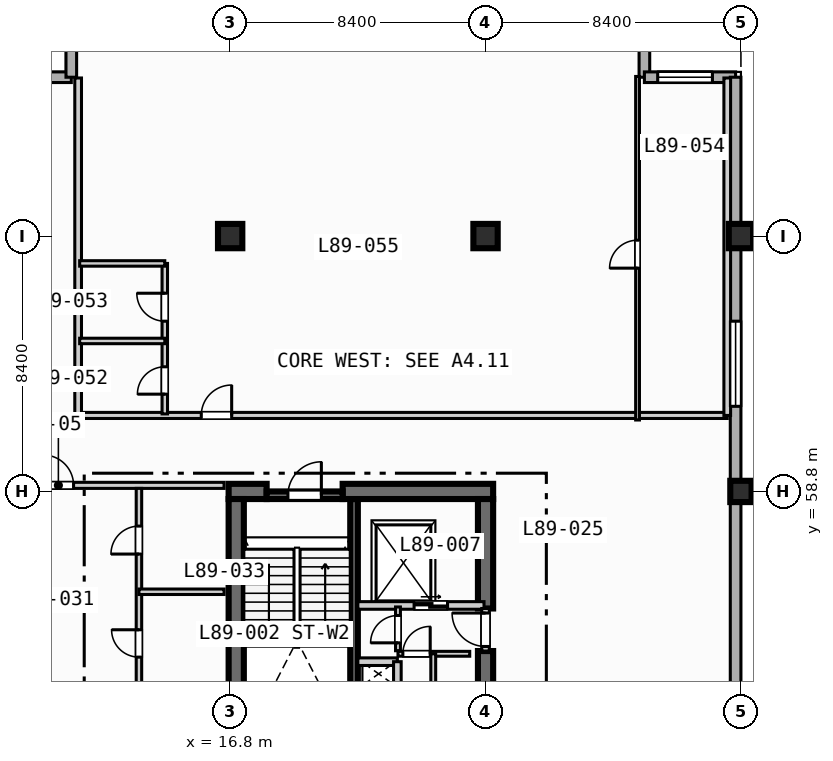
"""IFC4 building model, lengths in metres.
Left out: names, types, materials, properties, quantities, classifications, styles, units other than length and angle.
Written with IfcOpenShell. Run it as: python <this file> out.ifc"""

import sys

from ifc_helpers import new_model, si_unit, direction, frame, frame_2d, origin, origin_2d, place, context, subcontext, project, spatial, rectangle, extrude, element, fill, save


model = new_model("IFC4")
c1 = context("Model", 3, precision=1e-05, world=origin(), true_north=direction((0.0, 1.0)))
c2 = subcontext(c1, "Body", "Model", "MODEL_VIEW")
j1 = project(units=[si_unit("LENGTHUNIT", "METRE"), si_unit("PLANEANGLEUNIT", "RADIAN")], contexts=[c1])
p1 = place(None, origin())
s1 = spatial("IfcSite", under=j1, at=p1, CompositionType="ELEMENT")
p2 = place(p1, origin())
s2 = spatial("IfcBuilding", under=s1, at=p2, CompositionType="ELEMENT")
p3 = place(p2, frame((0.0, 0.0, 359.6)))
s3 = spatial("IfcBuildingStorey", under=s2, at=p3, CompositionType="ELEMENT", Elevation=359.6)
p4 = place(p3, frame((20.875, 50.5, 0.0), z_axis=(0.0, 0.0, 1.0), x_axis=(0.0, 1.0, 0.0)))
e1 = element("IfcWall", 1, at=p4, inside=s3, PredefinedType="SOLIDWALL", context=c2, shape_type="SweptSolid", body=[
    extrude(rectangle(XDim=8.05, YDim=0.25, at=frame_2d((4.025, 0.0))), origin(), (0.0, 0.0, 1.0), 3.9),
])
p5 = place(p3, frame((16.75, 58.8, 0.0), z_axis=(0.0, 0.0, 1.0), x_axis=(1.0, 0.0, 0.0)))
e2 = element("IfcWall", 2, at=p5, inside=s3, PredefinedType="SHEAR", context=c2, shape_type="SweptSolid", body=[
    extrude(rectangle(XDim=1.25, YDim=0.5, at=frame_2d((0.625, 0.0))), origin(), (0.0, 0.0, 1.0), 3.9),
])
p6 = place(p3, frame((20.5, 58.8, 0.0), z_axis=(0.0, 0.0, 1.0), x_axis=(1.0, 0.0, 0.0)))
e3 = element("IfcWall", 3, at=p6, inside=s3, PredefinedType="SHEAR", context=c2, shape_type="SweptSolid", body=[
    extrude(rectangle(XDim=4.95, YDim=0.5, at=frame_2d((2.475, 0.0))), origin(), (0.0, 0.0, 1.0), 3.9),
])
p7 = place(p3, frame((17.0, 42.2, 0.0), z_axis=(0.0, 0.0, 1.0), x_axis=(0.0, 1.0, 0.0)))
e4 = element("IfcWall", 4, at=p7, inside=s3, PredefinedType="SHEAR", context=c2, shape_type="SweptSolid", body=[
    extrude(rectangle(XDim=16.35, YDim=0.5, at=frame_2d((8.175, 0.0))), origin(), (0.0, 0.0, 1.0), 3.9),
])
p8 = place(p3, frame((25.2, 52.28, 0.0), z_axis=(0.0, 0.0, 1.0), x_axis=(0.0, 1.0, 0.0)))
e5 = element("IfcWall", 5, at=p8, inside=s3, PredefinedType="SHEAR", context=c2, shape_type="SweptSolid", body=[
    extrude(rectangle(XDim=1.27, YDim=0.5, at=frame_2d((0.635, 0.0))), origin(), (0.0, 0.0, 1.0), 3.9),
])
p9 = place(p3, frame((25.2, 54.95, 0.0), z_axis=(0.0, 0.0, 1.0), x_axis=(0.0, 1.0, 0.0)))
e6 = element("IfcWall", 6, at=p9, inside=s3, PredefinedType="SHEAR", context=c2, shape_type="SweptSolid", body=[
    extrude(rectangle(XDim=3.6, YDim=0.5, at=frame_2d((1.8, 0.0))), origin(), (0.0, 0.0, 1.0), 3.9),
])
for number, where, z_axis, x_axis in (
    (7, (16.8, 67.2, 0.0), (0.0, 0.0, 1.0), (1.0, 0.0, 0.0)),
    (8, (25.2, 67.2, 0.0), (0.0, 0.0, 1.0), (1.0, 0.0, 0.0)),
):
    element("IfcColumn", number, at=place(p3, frame(where, z_axis=z_axis, x_axis=x_axis)), inside=s3, PredefinedType="COLUMN", context=c2, shape_type="SweptSolid", body=[
        extrude(rectangle(XDim=0.8, YDim=0.8, at=origin_2d()), origin(), (0.0, 0.0, 1.0), 4.2),
    ])
p10 = place(p3, frame((33.6, 58.8, 0.0), z_axis=(0.0, 0.0, 1.0), x_axis=(1.0, 0.0, 0.0)))
e9 = element("IfcColumn", 9, at=p10, inside=s3, PredefinedType="COLUMN", context=c2, shape_type="SweptSolid", body=[
    extrude(rectangle(XDim=0.7, YDim=0.7, at=origin_2d()), origin(), (0.0, 0.0, 1.0), 4.2),
])
p11 = place(p3, frame((33.6, 67.2, 0.0), z_axis=(0.0, 0.0, 1.0), x_axis=(1.0, 0.0, 0.0)))
e10 = element("IfcColumn", 10, at=p11, inside=s3, PredefinedType="COLUMN", context=c2, shape_type="SweptSolid", body=[
    extrude(rectangle(XDim=0.8, YDim=0.8, at=origin_2d()), origin(), (0.0, 0.0, 1.0), 4.2),
])
for number, where, z_axis, x_axis in (
    (11, (8.575, 72.425, 0.0), (0.0, 0.0, 1.0), (1.0, 0.0, 0.0)),
    (12, (11.575, 72.425, 0.0), (0.0, 0.0, 1.0), (0.0, 1.0, 0.0)),
    (13, (30.425, 75.425, 0.0), (0.0, 0.0, 1.0), (0.0, -1.0, 0.0)),
):
    element("IfcWall", number, at=place(p3, frame(where, z_axis=z_axis, x_axis=x_axis)), inside=s3, PredefinedType="STANDARD", context=c2, shape_type="SweptSolid", body=[
        extrude(rectangle(XDim=3.0, YDim=0.35, at=frame_2d((1.5, 0.0))), origin(), (0.0, 0.0, 1.0), 3.9),
    ])
p12 = place(p3, frame((30.425, 72.425, 0.0), z_axis=(0.0, 0.0, 1.0), x_axis=(1.0, 0.0, 0.0)))
e14 = element("IfcWall", 14, at=p12, inside=s3, PredefinedType="STANDARD", context=c2, shape_type="SweptSolid", body=[
    extrude(rectangle(XDim=3.0, YDim=0.35, at=frame_2d((1.5, 0.0))), origin(), (0.0, 0.0, 1.0), 3.9),
])
p13 = place(p12, frame((0.438, 0.0, 0.85)))
e15 = element("IfcOpeningElement", 15, at=p13, cuts=e14, PredefinedType="OPENING", context=c2, shape_type="SweptSolid", body=[
    extrude(rectangle(XDim=1.8, YDim=1.8, at=frame_2d((0.9, 0.9))), frame((0.0, 0.185, 0.0), z_axis=(0.0, -1.0, 0.0), x_axis=(1.0, 0.0, 0.0)), (0.0, 0.0, 1.0), 0.37),
])
p14 = place(p3, frame((33.425, 72.425, 0.0), z_axis=(0.0, 0.0, 1.0), x_axis=(0.0, -1.0, 0.0)))
e16 = element("IfcWall", 16, at=p14, inside=s3, PredefinedType="STANDARD", context=c2, shape_type="SweptSolid", body=[
    extrude(rectangle(XDim=39.0, YDim=0.35, at=frame_2d((19.5, 0.0))), origin(), (0.0, 0.0, 1.0), 3.9),
])
p15 = place(p14, frame((33.225, 0.0, 0.85)))
e17 = element("IfcOpeningElement", 17, at=p15, cuts=e16, PredefinedType="OPENING", context=c2, shape_type="SweptSolid", body=[
    extrude(rectangle(XDim=2.8, YDim=2.1, at=frame_2d((1.4, 1.05))), frame((0.0, 0.185, 0.0), z_axis=(0.0, -1.0, 0.0), x_axis=(1.0, 0.0, 0.0)), (0.0, 0.0, 1.0), 0.37),
])
p16 = place(p14, frame((8.025, 0.0, 0.85)))
e18 = element("IfcOpeningElement", 18, at=p16, cuts=e16, PredefinedType="OPENING", context=c2, shape_type="SweptSolid", body=[
    extrude(rectangle(XDim=2.8, YDim=2.1, at=frame_2d((1.4, 1.05))), frame((0.0, 0.185, 0.0), z_axis=(0.0, -1.0, 0.0), x_axis=(1.0, 0.0, 0.0)), (0.0, 0.0, 1.0), 0.37),
])
p17 = place(p3, frame((18.0, 58.675, 0.0), z_axis=(0.0, 0.0, 1.0), x_axis=(1.0, 0.0, 0.0)))
e19 = element("IfcWall", 19, at=p17, inside=s3, PredefinedType="SOLIDWALL", context=c2, shape_type="SweptSolid", body=[
    extrude(rectangle(XDim=2.5, YDim=0.25, at=frame_2d((1.25, 0.0))), origin(), (0.0, 0.0, 1.0), 3.9),
])
p18 = place(p17, frame((0.7, 0.0, 0.0)))
e20 = element("IfcOpeningElement", 20, at=p18, cuts=e19, PredefinedType="OPENING", context=c2, shape_type="SweptSolid", body=[
    extrude(rectangle(XDim=1.1, YDim=2.15, at=frame_2d((0.55, 1.075))), frame((0.0, 0.135, 0.0), z_axis=(0.0, -1.0, 0.0), x_axis=(1.0, 0.0, 0.0)), (0.0, 0.0, 1.0), 0.27),
])
p19 = place(p3, frame((21.0, 55.05, 0.0), z_axis=(0.0, 0.0, 1.0), x_axis=(1.0, 0.0, 0.0)))
e21 = element("IfcWall", 21, at=p19, inside=s3, PredefinedType="SOLIDWALL", context=c2, shape_type="SweptSolid", body=[
    extrude(rectangle(XDim=4.15, YDim=0.25, at=frame_2d((2.075, 0.0))), origin(), (0.0, 0.0, 1.0), 3.9),
])
p20 = place(p19, frame((1.85, 0.0, 0.0)))
e22 = element("IfcOpeningElement", 22, at=p20, cuts=e21, PredefinedType="OPENING", context=c2, shape_type="SweptSolid", body=[
    extrude(rectangle(XDim=1.1, YDim=2.15, at=frame_2d((0.55, 1.075))), frame((0.0, 0.135, 0.0), z_axis=(0.0, -1.0, 0.0), x_axis=(1.0, 0.0, 0.0)), (0.0, 0.0, 1.0), 0.27),
])
p21 = place(p3, frame((25.2, 53.55, 0.0), z_axis=(0.0, 0.0, 1.0), x_axis=(0.0, 1.0, 0.0)))
e23 = element("IfcWall", 23, at=p21, inside=s3, PredefinedType="SOLIDWALL", context=c2, shape_type="SweptSolid", body=[
    extrude(rectangle(XDim=1.4, YDim=0.25, at=frame_2d((0.7, 0.0))), origin(), (0.0, 0.0, 1.0), 3.9),
])
p22 = place(p21, frame((0.15, 0.0, 0.0)))
e24 = element("IfcOpeningElement", 24, at=p22, cuts=e23, PredefinedType="OPENING", context=c2, shape_type="SweptSolid", body=[
    extrude(rectangle(XDim=1.1, YDim=2.15, at=frame_2d((0.55, 1.075))), frame((0.0, 0.135, 0.0), z_axis=(0.0, -1.0, 0.0), x_axis=(1.0, 0.0, 0.0)), (0.0, 0.0, 1.0), 0.27),
])
p23 = place(p3, frame((21.0, 53.2, 0.0), z_axis=(0.0, 0.0, 1.0), x_axis=(1.0, 0.0, 0.0)))
e25 = element("IfcWall", 25, at=p23, inside=s3, PredefinedType="SOLIDWALL", context=c2, shape_type="SweptSolid", body=[
    extrude(rectangle(XDim=1.3, YDim=0.25, at=frame_2d((0.65, 0.0))), origin(), (0.0, 0.0, 1.0), 3.9),
])
p24 = place(p3, frame((22.3, 52.36, 0.0), z_axis=(0.0, 0.0, 1.0), x_axis=(0.0, 1.0, 0.0)))
e26 = element("IfcWall", 26, at=p24, inside=s3, PredefinedType="SOLIDWALL", context=c2, shape_type="SweptSolid", body=[
    extrude(rectangle(XDim=0.84, YDim=0.25, at=frame_2d((0.42, 0.0))), origin(), (0.0, 0.0, 1.0), 3.9),
])
p25 = place(p3, frame((22.32, 53.56, 0.0), z_axis=(0.0, 0.0, 1.0), x_axis=(0.0, 1.0, 0.0)))
e27 = element("IfcWall", 27, at=p25, inside=s3, PredefinedType="PARTITIONING", context=c2, shape_type="SweptSolid", body=[
    extrude(rectangle(XDim=1.44, YDim=0.16, at=frame_2d((0.72, 0.0))), origin(), (0.0, 0.0, 1.0), 3.9),
])
p26 = place(p25, frame((0.26, 0.0, 0.0)))
e28 = element("IfcOpeningElement", 28, at=p26, cuts=e27, PredefinedType="OPENING", context=c2, shape_type="SweptSolid", body=[
    extrude(rectangle(XDim=0.9, YDim=2.1, at=frame_2d((0.45, 1.05))), frame((0.0, 0.09, 0.0), z_axis=(0.0, -1.0, 0.0), x_axis=(1.0, 0.0, 0.0)), (0.0, 0.0, 1.0), 0.18),
])
p27 = place(p3, frame((22.32, 53.46, 0.0), z_axis=(0.0, 0.0, 1.0), x_axis=(1.0, 0.0, 0.0)))
e29 = element("IfcWall", 29, at=p27, inside=s3, PredefinedType="PARTITIONING", context=c2, shape_type="SweptSolid", body=[
    extrude(rectangle(XDim=2.36, YDim=0.16, at=frame_2d((1.18, 0.0))), origin(), (0.0, 0.0, 1.0), 3.9),
])
p28 = place(p27, frame((0.16, 0.0, 0.0)))
e30 = element("IfcOpeningElement", 30, at=p28, cuts=e29, PredefinedType="OPENING", context=c2, shape_type="SweptSolid", body=[
    extrude(rectangle(XDim=0.9, YDim=2.1, at=frame_2d((0.45, 1.05))), frame((0.0, 0.09, 0.0), z_axis=(0.0, -1.0, 0.0), x_axis=(1.0, 0.0, 0.0)), (0.0, 0.0, 1.0), 0.18),
])
p29 = place(p3, frame((23.48, 52.36, 0.0), z_axis=(0.0, 0.0, 1.0), x_axis=(0.0, 1.0, 0.0)))
e31 = element("IfcWall", 31, at=p29, inside=s3, PredefinedType="PARTITIONING", context=c2, shape_type="SweptSolid", body=[
    extrude(rectangle(XDim=1.1, YDim=0.16, at=frame_2d((0.55, 0.0))), origin(), (0.0, 0.0, 1.0), 3.9),
])
p30 = place(p3, frame((8.65, 59.0, 0.0), z_axis=(0.0, 0.0, 1.0), x_axis=(1.0, 0.0, 0.0)))
e32 = element("IfcWall", 32, at=p30, inside=s3, PredefinedType="PARTITIONING", context=c2, shape_type="SweptSolid", body=[
    extrude(rectangle(XDim=7.95, YDim=0.2, at=frame_2d((3.975, 0.0))), origin(), (0.0, 0.0, 1.0), 3.437),
])
p31 = place(p30, frame((2.0, 0.0, 0.0)))
e33 = element("IfcOpeningElement", 33, at=p31, cuts=e32, PredefinedType="OPENING", context=c2, shape_type="SweptSolid", body=[
    extrude(rectangle(XDim=1.0, YDim=2.15, at=frame_2d((0.5, 1.075))), frame((0.0, 0.11, 0.0), z_axis=(0.0, -1.0, 0.0), x_axis=(1.0, 0.0, 0.0)), (0.0, 0.0, 1.0), 0.22),
])
p32 = place(p3, frame((13.8, 52.1, 0.0), z_axis=(0.0, 0.0, 1.0), x_axis=(0.0, 1.0, 0.0)))
e34 = element("IfcWall", 34, at=p32, inside=s3, PredefinedType="PLUMBINGWALL", context=c2, shape_type="SweptSolid", body=[
    extrude(rectangle(XDim=6.8, YDim=0.18, at=frame_2d((3.4, 0.0))), origin(), (0.0, 0.0, 1.0), 3.9),
])
p33 = place(p32, frame((1.25, 0.0, 0.0)))
e35 = element("IfcOpeningElement", 35, at=p33, cuts=e34, PredefinedType="OPENING", context=c2, shape_type="SweptSolid", body=[
    extrude(rectangle(XDim=0.9, YDim=2.1, at=frame_2d((0.45, 1.05))), frame((0.0, 0.1, 0.0), z_axis=(0.0, -1.0, 0.0), x_axis=(1.0, 0.0, 0.0)), (0.0, 0.0, 1.0), 0.2),
])
p34 = place(p32, frame((4.64, 0.0, 0.0)))
e36 = element("IfcOpeningElement", 36, at=p34, cuts=e34, PredefinedType="OPENING", context=c2, shape_type="SweptSolid", body=[
    extrude(rectangle(XDim=0.92, YDim=2.1, at=frame_2d((0.46, 1.05))), frame((0.0, 0.1, 0.0), z_axis=(0.0, -1.0, 0.0), x_axis=(1.0, 0.0, 0.0)), (0.0, 0.0, 1.0), 0.2),
])
p35 = place(p3, frame((13.8, 55.5, 0.0), z_axis=(0.0, 0.0, 1.0), x_axis=(1.0, 0.0, 0.0)))
e37 = element("IfcWall", 37, at=p35, inside=s3, PredefinedType="PLUMBINGWALL", context=c2, shape_type="SweptSolid", body=[
    extrude(rectangle(XDim=2.8, YDim=0.18, at=frame_2d((1.4, 0.0))), origin(), (0.0, 0.0, 1.0), 3.9),
])
p36 = place(p3, frame((11.8, 61.3, 0.0), z_axis=(0.0, 0.0, 1.0), x_axis=(1.0, 0.0, 0.0)))
e38 = element("IfcWall", 38, at=p36, inside=s3, PredefinedType="PARTITIONING", context=c2, shape_type="SweptSolid", body=[
    extrude(rectangle(XDim=21.35, YDim=0.2, at=frame_2d((10.675, 0.0))), origin(), (0.0, 0.0, 1.0), 3.9),
])
p37 = place(p36, frame((4.05, 0.0, 0.0)))
e39 = element("IfcOpeningElement", 39, at=p37, cuts=e38, PredefinedType="OPENING", context=c2, shape_type="SweptSolid", body=[
    extrude(rectangle(XDim=1.0, YDim=2.15, at=frame_2d((0.5, 1.075))), frame((0.0, 0.11, 0.0), z_axis=(0.0, -1.0, 0.0), x_axis=(1.0, 0.0, 0.0)), (0.0, 0.0, 1.0), 0.22),
])
for number, where, z_axis, x_axis in (
    (40, (33.15, 61.3, 0.0), (0.0, 0.0, 1.0), (0.0, 1.0, 0.0)),
    (41, (11.8, 61.3, 0.0), (0.0, 0.0, 1.0), (0.0, 1.0, 0.0)),
):
    element("IfcWall", number, at=place(p3, frame(where, z_axis=z_axis, x_axis=x_axis)), inside=s3, PredefinedType="PARTITIONING", context=c2, shape_type="SweptSolid", body=[
        extrude(rectangle(XDim=11.1, YDim=0.22, at=frame_2d((5.55, 0.0))), origin(), (0.0, 0.0, 1.0), 3.9),
    ])
p38 = place(p3, frame((14.65, 61.35, 0.0), z_axis=(0.0, 0.0, 1.0), x_axis=(0.0, 1.0, 0.0)))
e42 = element("IfcWall", 42, at=p38, inside=s3, PredefinedType="PLUMBINGWALL", context=c2, shape_type="SweptSolid", body=[
    extrude(rectangle(XDim=4.95, YDim=0.18, at=frame_2d((2.475, 0.0))), origin(), (0.0, 0.0, 1.0), 3.9),
])
p39 = place(p38, frame((0.65, 0.0, 0.0)))
e43 = element("IfcOpeningElement", 43, at=p39, cuts=e42, PredefinedType="OPENING", context=c2, shape_type="SweptSolid", body=[
    extrude(rectangle(XDim=0.9, YDim=2.1, at=frame_2d((0.45, 1.05))), frame((0.0, 0.1, 0.0), z_axis=(0.0, -1.0, 0.0), x_axis=(1.0, 0.0, 0.0)), (0.0, 0.0, 1.0), 0.2),
])
p40 = place(p38, frame((3.05, 0.0, 0.0)))
e44 = element("IfcOpeningElement", 44, at=p40, cuts=e42, PredefinedType="OPENING", context=c2, shape_type="SweptSolid", body=[
    extrude(rectangle(XDim=0.92, YDim=2.1, at=frame_2d((0.46, 1.05))), frame((0.0, 0.1, 0.0), z_axis=(0.0, -1.0, 0.0), x_axis=(1.0, 0.0, 0.0)), (0.0, 0.0, 1.0), 0.2),
])
for number, where, z_axis, x_axis in (
    (45, (11.85, 63.75, 0.0), (0.0, 0.0, 1.0), (1.0, 0.0, 0.0)),
    (46, (11.85, 66.3, 0.0), (0.0, 0.0, 1.0), (1.0, 0.0, 0.0)),
):
    element("IfcWall", number, at=place(p3, frame(where, z_axis=z_axis, x_axis=x_axis)), inside=s3, PredefinedType="PLUMBINGWALL", context=c2, shape_type="SweptSolid", body=[
        extrude(rectangle(XDim=2.8, YDim=0.18, at=frame_2d((1.4, 0.0))), origin(), (0.0, 0.0, 1.0), 3.9),
    ])
p41 = place(p3, frame((30.2, 61.15, 0.0), z_axis=(0.0, 0.0, 1.0), x_axis=(0.0, 1.0, 0.0)))
e47 = element("IfcWall", 47, at=p41, inside=s3, PredefinedType="PARTITIONING", context=c2, shape_type="SweptSolid", body=[
    extrude(rectangle(XDim=11.3, YDim=0.125, at=frame_2d((5.65, 0.0))), origin(), (0.0, 0.0, 1.0), 3.9),
])
p42 = place(p41, frame((4.995, 0.0, 0.0)))
e48 = element("IfcOpeningElement", 48, at=p42, cuts=e47, PredefinedType="OPENING", context=c2, shape_type="SweptSolid", body=[
    extrude(rectangle(XDim=0.92, YDim=2.1, at=frame_2d((0.46, 1.05))), frame((0.0, 0.073, 0.0), z_axis=(0.0, -1.0, 0.0), x_axis=(1.0, 0.0, 0.0)), (0.0, 0.0, 1.0), 0.145),
])
p43 = place(p13, origin())
e49 = element("IfcWindow", 49, at=p43, inside=s3, PartitioningType="SINGLE_PANEL", PredefinedType="WINDOW", context=c2, shape_type="SweptSolid", body=[
    extrude(rectangle(XDim=1.8, YDim=1.8, at=frame_2d((0.9, 0.9))), frame((0.0, 0.03, 0.0), z_axis=(0.0, -1.0, 0.0), x_axis=(1.0, 0.0, 0.0)), (0.0, 0.0, 1.0), 0.06),
])
fill(e15, e49)
p44 = place(p16, origin())
e50 = element("IfcWindow", 50, at=p44, inside=s3, PartitioningType="SINGLE_PANEL", PredefinedType="WINDOW", context=c2, shape_type="SweptSolid", body=[
    extrude(rectangle(XDim=2.8, YDim=2.1, at=frame_2d((1.4, 1.05))), frame((0.0, 0.03, 0.0), z_axis=(0.0, -1.0, 0.0), x_axis=(1.0, 0.0, 0.0)), (0.0, 0.0, 1.0), 0.06),
])
fill(e18, e50)
p45 = place(p18, origin())
e51 = element("IfcDoor", 51, at=p45, inside=s3, OperationType="SINGLE_SWING_RIGHT", PredefinedType="DOOR", context=c2, shape_type="SweptSolid", body=[
    extrude(rectangle(XDim=1.1, YDim=2.15, at=frame_2d((0.55, 1.075))), frame((0.0, 0.025, 0.0), z_axis=(0.0, -1.0, 0.0), x_axis=(1.0, 0.0, 0.0)), (0.0, 0.0, 1.0), 0.05),
])
fill(e20, e51)
p46 = place(p20, origin())
e52 = element("IfcDoor", 52, at=p46, inside=s3, OperationType="SLIDING_TO_LEFT", PredefinedType="DOOR", context=c2, shape_type="SweptSolid", body=[
    extrude(rectangle(XDim=1.1, YDim=2.15, at=frame_2d((0.55, 1.075))), frame((0.0, 0.025, 0.0), z_axis=(0.0, -1.0, 0.0), x_axis=(1.0, 0.0, 0.0)), (0.0, 0.0, 1.0), 0.05),
])
fill(e22, e52)
p47 = place(p22, origin())
e53 = element("IfcDoor", 53, at=p47, inside=s3, OperationType="SINGLE_SWING_RIGHT", PredefinedType="DOOR", context=c2, shape_type="SweptSolid", body=[
    extrude(rectangle(XDim=1.1, YDim=2.15, at=frame_2d((0.55, 1.075))), frame((0.0, 0.025, 0.0), z_axis=(0.0, -1.0, 0.0), x_axis=(1.0, 0.0, 0.0)), (0.0, 0.0, 1.0), 0.05),
])
fill(e24, e53)
p48 = place(p26, origin())
e54 = element("IfcDoor", 54, at=p48, inside=s3, OperationType="SINGLE_SWING_LEFT", PredefinedType="DOOR", context=c2, shape_type="SweptSolid", body=[
    extrude(rectangle(XDim=0.9, YDim=2.1, at=frame_2d((0.45, 1.05))), frame((0.0, 0.025, 0.0), z_axis=(0.0, -1.0, 0.0), x_axis=(1.0, 0.0, 0.0)), (0.0, 0.0, 1.0), 0.05),
])
fill(e28, e54)
p49 = place(p28, origin())
e55 = element("IfcDoor", 55, at=p49, inside=s3, OperationType="SINGLE_SWING_RIGHT", PredefinedType="DOOR", context=c2, shape_type="SweptSolid", body=[
    extrude(rectangle(XDim=0.9, YDim=2.1, at=frame_2d((0.45, 1.05))), frame((0.0, 0.025, 0.0), z_axis=(0.0, -1.0, 0.0), x_axis=(1.0, 0.0, 0.0)), (0.0, 0.0, 1.0), 0.05),
])
fill(e30, e55)
p50 = place(p31, origin())
e56 = element("IfcDoor", 56, at=p50, inside=s3, OperationType="SINGLE_SWING_LEFT", PredefinedType="DOOR", context=c2, shape_type="SweptSolid", body=[
    extrude(rectangle(XDim=1.0, YDim=2.15, at=frame_2d((0.5, 1.075))), frame((0.0, 0.025, 0.0), z_axis=(0.0, -1.0, 0.0), x_axis=(1.0, 0.0, 0.0)), (0.0, 0.0, 1.0), 0.05),
])
fill(e33, e56)
p51 = place(p33, origin())
e57 = element("IfcDoor", 57, at=p51, inside=s3, OperationType="SINGLE_SWING_RIGHT", PredefinedType="DOOR", context=c2, shape_type="SweptSolid", body=[
    extrude(rectangle(XDim=0.9, YDim=2.1, at=frame_2d((0.45, 1.05))), frame((0.0, 0.025, 0.0), z_axis=(0.0, -1.0, 0.0), x_axis=(1.0, 0.0, 0.0)), (0.0, 0.0, 1.0), 0.05),
])
fill(e35, e57)
p52 = place(p34, origin())
e58 = element("IfcDoor", 58, at=p52, inside=s3, OperationType="SINGLE_SWING_LEFT", PredefinedType="DOOR", context=c2, shape_type="SweptSolid", body=[
    extrude(rectangle(XDim=0.92, YDim=2.1, at=frame_2d((0.46, 1.05))), frame((0.0, 0.025, 0.0), z_axis=(0.0, -1.0, 0.0), x_axis=(1.0, 0.0, 0.0)), (0.0, 0.0, 1.0), 0.05),
])
fill(e36, e58)
p53 = place(p37, origin())
e59 = element("IfcDoor", 59, at=p53, inside=s3, OperationType="SINGLE_SWING_RIGHT", PredefinedType="DOOR", context=c2, shape_type="SweptSolid", body=[
    extrude(rectangle(XDim=1.0, YDim=2.15, at=frame_2d((0.5, 1.075))), frame((0.0, 0.025, 0.0), z_axis=(0.0, -1.0, 0.0), x_axis=(1.0, 0.0, 0.0)), (0.0, 0.0, 1.0), 0.05),
])
fill(e39, e59)
p54 = place(p39, origin())
e60 = element("IfcDoor", 60, at=p54, inside=s3, OperationType="SINGLE_SWING_LEFT", PredefinedType="DOOR", context=c2, shape_type="SweptSolid", body=[
    extrude(rectangle(XDim=0.9, YDim=2.1, at=frame_2d((0.45, 1.05))), frame((0.0, 0.025, 0.0), z_axis=(0.0, -1.0, 0.0), x_axis=(1.0, 0.0, 0.0)), (0.0, 0.0, 1.0), 0.05),
])
fill(e43, e60)
p55 = place(p40, origin())
e61 = element("IfcDoor", 61, at=p55, inside=s3, OperationType="SINGLE_SWING_RIGHT", PredefinedType="DOOR", context=c2, shape_type="SweptSolid", body=[
    extrude(rectangle(XDim=0.92, YDim=2.1, at=frame_2d((0.46, 1.05))), frame((0.0, 0.025, 0.0), z_axis=(0.0, -1.0, 0.0), x_axis=(1.0, 0.0, 0.0)), (0.0, 0.0, 1.0), 0.05),
])
fill(e44, e61)
p56 = place(p42, origin())
e62 = element("IfcDoor", 62, at=p56, inside=s3, OperationType="SINGLE_SWING_LEFT", PredefinedType="DOOR", context=c2, shape_type="SweptSolid", body=[
    extrude(rectangle(XDim=0.92, YDim=2.1, at=frame_2d((0.46, 1.05))), frame((0.0, 0.025, 0.0), z_axis=(0.0, -1.0, 0.0), x_axis=(1.0, 0.0, 0.0)), (0.0, 0.0, 1.0), 0.05),
])
fill(e48, e62)
save(model, sys.argv[1])
